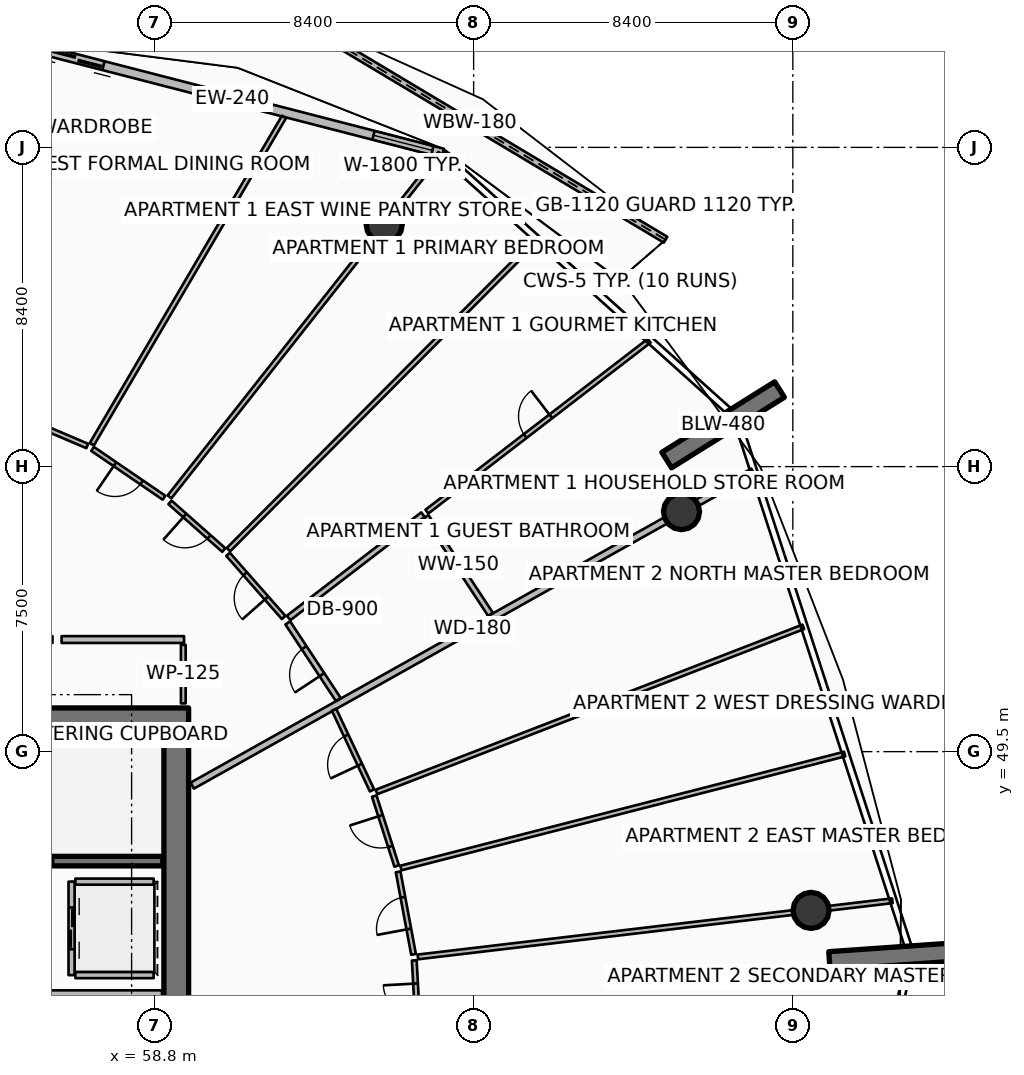
"""IFC4 building model, lengths in metres.
Left out: names, types, materials, properties, quantities, classifications, styles, units other than length and angle.
Written with IfcOpenShell. Run it as: python <this file> out.ifc"""

import sys

from ifc_helpers import new_model, si_unit, direction, frame, frame_2d, origin, origin_2d, place, context, subcontext, project, spatial, polyline, rectangle, circle, outline, extrude, element, fill, save


model = new_model("IFC4")
c1 = context("Model", 3, precision=1e-05, world=origin(), true_north=direction((0.0, 1.0)))
c2 = subcontext(c1, "Body", "Model", "MODEL_VIEW")
j1 = project(units=[si_unit("LENGTHUNIT", "METRE"), si_unit("PLANEANGLEUNIT", "RADIAN")], contexts=[c1])
p1 = place(None, origin())
s1 = spatial("IfcSite", under=j1, at=p1, CompositionType="ELEMENT")
p2 = place(p1, origin())
s2 = spatial("IfcBuilding", under=s1, at=p2, CompositionType="ELEMENT")
p3 = place(p2, frame((0.0, 0.0, 248.25)))
s3 = spatial("IfcBuildingStorey", under=s2, at=p3, CompositionType="ELEMENT", Elevation=248.25)
p4 = place(p3, frame((49.95, 50.325, 0.0), z_axis=(0.0, 0.0, 1.0), x_axis=(1.0, 0.0, 0.0)))
e1 = element("IfcWall", 1, at=p4, inside=s3, PredefinedType="SHEAR", context=c2, shape_type="SweptSolid", body=[
    extrude(rectangle(XDim=9.75, YDim=0.65, at=frame_2d((4.875, 0.0))), origin(), (0.0, 0.0, 1.0), 3.85),
])
p5 = place(p3, frame((59.375, 34.0, 0.0), z_axis=(0.0, 0.0, 1.0), x_axis=(0.0, 1.0, 0.0)))
e2 = element("IfcWall", 2, at=p5, inside=s3, PredefinedType="SHEAR", context=c2, shape_type="SweptSolid", body=[
    extrude(rectangle(XDim=16.0, YDim=0.65, at=frame_2d((8.0, 0.0))), origin(), (0.0, 0.0, 1.0), 3.85),
])
p6 = place(p3, frame((72.281, 57.173, 0.0), z_axis=(0.0, 0.0, 1.0), x_axis=(0.848033572426, 0.529942506352, 0.0)))
e3 = element("IfcWall", 3, at=p6, inside=s3, PredefinedType="SOLIDWALL", context=c2, shape_type="SweptSolid", body=[
    extrude(rectangle(XDim=3.5, YDim=0.48, at=frame_2d((1.75, 0.0))), origin(), (0.0, 0.0, 1.0), 3.85),
])
p7 = place(p3, frame((76.562, 43.997, 0.0), z_axis=(0.0, 0.0, 1.0), x_axis=(0.997563824095, 0.069759707979, 0.0)))
e4 = element("IfcWall", 4, at=p7, inside=s3, PredefinedType="SOLIDWALL", context=c2, shape_type="SweptSolid", body=[
    extrude(rectangle(XDim=3.5, YDim=0.48, at=frame_2d((1.75, 0.0))), origin(), (0.0, 0.0, 1.0), 3.85),
])
for number, where, z_axis, x_axis in (
    (5, (72.67, 55.816, 0.0), (0.0, 0.0, 1.0), (1.0, 0.0, 0.0)),
    (6, (64.847, 63.371, 0.0), (0.0, 0.0, 1.0), (1.0, 0.0, 0.0)),
    (7, (76.08, 45.323, 0.0), (0.0, 0.0, 1.0), (1.0, 0.0, 0.0)),
):
    element("IfcColumn", number, at=place(p3, frame(where, z_axis=z_axis, x_axis=x_axis)), inside=s3, PredefinedType="COLUMN", context=c2, shape_type="SweptSolid", body=[
        extrude(circle(Radius=0.475, at=origin_2d()), origin(), (0.0, 0.0, 1.0), 3.59),
    ])
p8 = place(p3, frame((72.251, 62.97, 0.0), z_axis=(0.0, 0.0, 1.0), x_axis=(-0.858273121585, 0.513193188541, 0.0)))
e8 = element("IfcWall", 8, at=p8, inside=s3, PredefinedType="PARAPET", context=c2, shape_type="SweptSolid", body=[
    extrude(outline(polyline([(0.0, 0.0), (11.996, 0.0), (11.995, 1.348), (5.998, 1.182), (0.0, 1.12), (0.0, 0.0)])), frame((0.0, 0.09, 0.0), z_axis=(0.0, -1.0, 0.0), x_axis=(1.0, 0.0, 0.0)), (0.0, 0.0, 1.0), 0.18),
])
p9 = place(p3, frame((66.386, 65.249, 0.0), z_axis=(0.0, 0.0, 1.0), x_axis=(-0.968343758421, 0.249620442927, 0.0)))
e9 = element("IfcWall", 9, at=p9, inside=s3, PredefinedType="SOLIDWALL", context=c2, shape_type="SweptSolid", body=[
    extrude(rectangle(XDim=11.438, YDim=0.24, at=frame_2d((5.719, 0.0))), origin(), (0.0, 0.0, 1.0), 2.54),
])
p10 = place(p9, frame((9.218, 0.0, 0.0)))
e10 = element("IfcOpeningElement", 10, at=p10, cuts=e9, PredefinedType="OPENING", context=c2, shape_type="SweptSolid", body=[
    extrude(rectangle(XDim=1.45, YDim=2.15, at=frame_2d((0.725, 1.075))), frame((0.0, 0.13, 0.0), z_axis=(0.0, -1.0, 0.0), x_axis=(1.0, 0.0, 0.0)), (0.0, 0.0, 1.0), 0.26),
])
p11 = place(p9, frame((0.28, 0.0, 0.65)))
e11 = element("IfcOpeningElement", 11, at=p11, cuts=e9, PredefinedType="OPENING", context=c2, shape_type="SweptSolid", body=[
    extrude(rectangle(XDim=1.6, YDim=1.5, at=frame_2d((0.8, 0.75))), frame((0.0, 0.13, 0.0), z_axis=(0.0, -1.0, 0.0), x_axis=(1.0, 0.0, 0.0)), (0.0, 0.0, 1.0), 0.26),
])
p12 = place(p3, frame((51.48, 46.62, 0.0), z_axis=(0.0, 0.0, 1.0), x_axis=(1.0, 0.0, 0.0)))
e12 = element("IfcWall", 12, at=p12, inside=s3, PredefinedType="SOLIDWALL", context=c2, shape_type="SweptSolid", body=[
    extrude(rectangle(XDim=7.54, YDim=0.25, at=frame_2d((3.77, 0.0))), origin(), (0.0, 0.0, 1.0), 3.59),
])
p13 = place(p12, frame((0.3, 0.0, 0.0)))
e13 = element("IfcOpeningElement", 13, at=p13, cuts=e12, PredefinedType="OPENING", context=c2, shape_type="SweptSolid", body=[
    extrude(rectangle(XDim=1.55, YDim=2.15, at=frame_2d((0.775, 1.075))), frame((0.0, 0.135, 0.0), z_axis=(0.0, -1.0, 0.0), x_axis=(1.0, 0.0, 0.0)), (0.0, 0.0, 1.0), 0.27),
])
p14 = place(p3, frame((56.62, 46.08, 0.0), z_axis=(0.0, 0.0, 1.0), x_axis=(0.0, -1.0, 0.0)))
e14 = element("IfcWall", 14, at=p14, inside=s3, PredefinedType="PARTITIONING", context=c2, shape_type="SweptSolid", body=[
    extrude(rectangle(XDim=2.46, YDim=0.16, at=frame_2d((1.23, 0.0))), origin(), (0.0, 0.0, 1.0), 3.59),
])
p15 = place(p14, frame((0.68, 0.0, 0.0)))
e15 = element("IfcOpeningElement", 15, at=p15, cuts=e14, PredefinedType="OPENING", context=c2, shape_type="SweptSolid", body=[
    extrude(rectangle(XDim=1.1, YDim=2.1, at=frame_2d((0.55, 1.05))), frame((0.0, 0.09, 0.0), z_axis=(0.0, -1.0, 0.0), x_axis=(1.0, 0.0, 0.0)), (0.0, 0.0, 1.0), 0.18),
])
for number, where, z_axis, x_axis in (
    (16, (56.72, 46.08, 0.0), (0.0, 0.0, 1.0), (1.0, 0.0, 0.0)),
    (17, (56.72, 43.62, 0.0), (0.0, 0.0, 1.0), (1.0, 0.0, 0.0)),
):
    element("IfcWall", number, at=place(p3, frame(where, z_axis=z_axis, x_axis=x_axis)), inside=s3, PredefinedType="PARTITIONING", context=c2, shape_type="SweptSolid", body=[
        extrude(rectangle(XDim=2.06, YDim=0.16, at=frame_2d((1.03, 0.0))), origin(), (0.0, 0.0, 1.0), 3.59),
    ])
p16 = place(p3, frame((50.12, 43.12, 0.0), z_axis=(0.0, 0.0, 1.0), x_axis=(1.0, 0.0, 0.0)))
e18 = element("IfcWall", 18, at=p16, inside=s3, PredefinedType="PARTITIONING", context=c2, shape_type="SweptSolid", body=[
    extrude(rectangle(XDim=8.88, YDim=0.2, at=frame_2d((4.44, 0.0))), origin(), (0.0, 0.0, 1.0), 3.59),
])
p17 = place(p3, frame((59.56, 50.77, 0.0), z_axis=(0.0, 0.0, 1.0), x_axis=(0.0, 1.0, 0.0)))
e19 = element("IfcWall", 19, at=p17, inside=s3, PredefinedType="PARTITIONING", context=c2, shape_type="SweptSolid", body=[
    extrude(rectangle(XDim=1.54, YDim=0.125, at=frame_2d((0.77, 0.0))), origin(), (0.0, 0.0, 1.0), 3.03),
])
p18 = place(p3, frame((59.796, 48.606, 0.0), z_axis=(0.0, 0.0, 1.0), x_axis=(0.872493213488, 0.488626229767, 0.0)))
e20 = element("IfcWall", 20, at=p18, inside=s3, PredefinedType="PARTITIONING", context=c2, shape_type="SweptSolid", body=[
    extrude(rectangle(XDim=16.91, YDim=0.18, at=frame_2d((8.455, 0.0))), origin(), (0.0, 0.0, 1.0), 2.957),
])
p19 = place(p3, frame((59.58, 52.45, 0.0), z_axis=(0.0, 0.0, 1.0), x_axis=(-1.0, 0.0, 0.0)))
e21 = element("IfcWall", 21, at=p19, inside=s3, PredefinedType="PARTITIONING", context=c2, shape_type="SweptSolid", body=[
    extrude(rectangle(XDim=3.222, YDim=0.18, at=frame_2d((1.611, 0.0))), origin(), (0.0, 0.0, 1.0), 2.957),
])
p20 = place(p3, frame((63.639, 50.872, 0.0), z_axis=(0.0, 0.0, 1.0), x_axis=(-0.550539267926, 0.834809268319, 0.0)))
e22 = element("IfcWall", 22, at=p20, inside=s3, PredefinedType="PARTITIONING", context=c2, shape_type="SweptSolid", body=[
    extrude(rectangle(XDim=2.414, YDim=0.15, at=frame_2d((1.207, 0.0))), origin(), (0.0, 0.0, 1.0), 2.957),
])
p21 = place(p20, frame((0.782, 0.0, 0.0)))
e23 = element("IfcOpeningElement", 23, at=p21, cuts=e22, PredefinedType="OPENING", context=c2, shape_type="SweptSolid", body=[
    extrude(rectangle(XDim=0.85, YDim=2.06, at=frame_2d((0.425, 1.03))), frame((0.0, 0.085, 0.0), z_axis=(0.0, -1.0, 0.0), x_axis=(1.0, 0.0, 0.0)), (0.0, 0.0, 1.0), 0.17),
])
p22 = place(p3, frame((67.643, 53.115, 0.0), z_axis=(0.0, 0.0, 1.0), x_axis=(-0.550484224605, 0.834845565635, 0.0)))
e24 = element("IfcWall", 24, at=p22, inside=s3, PredefinedType="PARTITIONING", context=c2, shape_type="SweptSolid", body=[
    extrude(rectangle(XDim=3.079, YDim=0.15, at=frame_2d((1.54, 0.0))), origin(), (0.0, 0.0, 1.0), 2.957),
])
p23 = place(p3, frame((62.331, 53.018, 0.0), z_axis=(0.0, 0.0, 1.0), x_axis=(0.792803030826, 0.609477935871, 0.0)))
e25 = element("IfcWall", 25, at=p23, inside=s3, PredefinedType="PARTITIONING", context=c2, shape_type="SweptSolid", body=[
    extrude(rectangle(XDim=4.46, YDim=0.15, at=frame_2d((2.23, 0.0))), origin(), (0.0, 0.0, 1.0), 3.03),
])
p24 = place(p3, frame((65.97, 55.815, 0.0), z_axis=(0.0, 0.0, 1.0), x_axis=(0.792798660545, 0.609483620647, 0.0)))
e26 = element("IfcWall", 26, at=p24, inside=s3, PredefinedType="PARTITIONING", context=c2, shape_type="SweptSolid", body=[
    extrude(rectangle(XDim=7.377, YDim=0.125, at=frame_2d((3.688, 0.0))), origin(), (0.0, 0.0, 1.0), 3.03),
])
p25 = place(p24, frame((3.263, 0.0, 0.0)))
e27 = element("IfcOpeningElement", 27, at=p25, cuts=e26, PredefinedType="OPENING", context=c2, shape_type="SweptSolid", body=[
    extrude(rectangle(XDim=0.85, YDim=2.06, at=frame_2d((0.425, 1.03))), frame((0.0, 0.073, 0.0), z_axis=(0.0, -1.0, 0.0), x_axis=(1.0, 0.0, 0.0)), (0.0, 0.0, 1.0), 0.145),
])
p26 = place(p3, frame((60.749, 54.815, 0.0), z_axis=(0.0, 0.0, 1.0), x_axis=(0.705267705861, 0.708941085753, 0.0)))
e28 = element("IfcWall", 28, at=p26, inside=s3, PredefinedType="PARTITIONING", context=c2, shape_type="SweptSolid", body=[
    extrude(rectangle(XDim=11.498, YDim=0.125, at=frame_2d((5.749, 0.0))), origin(), (0.0, 0.0, 1.0), 3.03),
])
p27 = place(p3, frame((62.2, 53.031, 0.0), z_axis=(0.0, 0.0, 1.0), x_axis=(-0.660650282497, 0.750693815238, 0.0)))
e29 = element("IfcWall", 29, at=p27, inside=s3, PredefinedType="PARTITIONING", context=c2, shape_type="SweptSolid", body=[
    extrude(rectangle(XDim=2.212, YDim=0.125, at=frame_2d((1.106, 0.0))), origin(), (0.0, 0.0, 1.0), 3.03),
])
p28 = place(p27, frame((0.681, 0.0, 0.0)))
e30 = element("IfcOpeningElement", 30, at=p28, cuts=e29, PredefinedType="OPENING", context=c2, shape_type="SweptSolid", body=[
    extrude(rectangle(XDim=0.85, YDim=2.06, at=frame_2d((0.425, 1.03))), frame((0.0, 0.073, 0.0), z_axis=(0.0, -1.0, 0.0), x_axis=(1.0, 0.0, 0.0)), (0.0, 0.0, 1.0), 0.145),
])
p29 = place(p3, frame((60.626, 54.805, 0.0), z_axis=(0.0, 0.0, 1.0), x_axis=(-0.748419746602, 0.663225363581, 0.0)))
e31 = element("IfcWall", 31, at=p29, inside=s3, PredefinedType="PARTITIONING", context=c2, shape_type="SweptSolid", body=[
    extrude(rectangle(XDim=1.891, YDim=0.125, at=frame_2d((0.946, 0.0))), origin(), (0.0, 0.0, 1.0), 2.957),
])
p30 = place(p29, frame((0.521, 0.0, 0.0)))
e32 = element("IfcOpeningElement", 32, at=p30, cuts=e31, PredefinedType="OPENING", context=c2, shape_type="SweptSolid", body=[
    extrude(rectangle(XDim=0.85, YDim=2.06, at=frame_2d((0.425, 1.03))), frame((0.0, 0.073, 0.0), z_axis=(0.0, -1.0, 0.0), x_axis=(1.0, 0.0, 0.0)), (0.0, 0.0, 1.0), 0.145),
])
p31 = place(p3, frame((56.118, 52.45, 0.0), z_axis=(0.0, 0.0, 1.0), x_axis=(-1.0, 0.0, 0.0)))
e33 = element("IfcWall", 33, at=p31, inside=s3, PredefinedType="PARTITIONING", context=c2, shape_type="SweptSolid", body=[
    extrude(rectangle(XDim=5.051, YDim=0.18, at=frame_2d((2.525, 0.0))), origin(), (0.0, 0.0, 1.0), 2.957),
])
p32 = place(p3, frame((59.198, 56.204, 0.0), z_axis=(0.0, 0.0, 1.0), x_axis=(0.619101452742, 0.785311015593, 0.0)))
e34 = element("IfcWall", 34, at=p32, inside=s3, PredefinedType="PARTITIONING", context=c2, shape_type="SweptSolid", body=[
    extrude(rectangle(XDim=11.509, YDim=0.125, at=frame_2d((5.754, 0.0))), origin(), (0.0, 0.0, 1.0), 2.957),
])
p33 = place(p3, frame((57.153, 57.588, 0.0), z_axis=(0.0, 0.0, 1.0), x_axis=(0.506323477253, 0.862343630105, 0.0)))
e35 = element("IfcWall", 35, at=p33, inside=s3, PredefinedType="PARTITIONING", context=c2, shape_type="SweptSolid", body=[
    extrude(rectangle(XDim=9.988, YDim=0.125, at=frame_2d((4.994, 0.0))), origin(), (0.0, 0.0, 1.0), 3.03),
])
p34 = place(p3, frame((59.053, 56.182, 0.0), z_axis=(0.0, 0.0, 1.0), x_axis=(-0.825709590898, 0.56409544538, 0.0)))
e36 = element("IfcWall", 36, at=p34, inside=s3, PredefinedType="PARTITIONING", context=c2, shape_type="SweptSolid", body=[
    extrude(rectangle(XDim=2.276, YDim=0.125, at=frame_2d((1.138, 0.0))), origin(), (0.0, 0.0, 1.0), 2.957),
])
p35 = place(p34, frame((0.713, 0.0, 0.0)))
e37 = element("IfcOpeningElement", 37, at=p35, cuts=e36, PredefinedType="OPENING", context=c2, shape_type="SweptSolid", body=[
    extrude(rectangle(XDim=0.85, YDim=2.06, at=frame_2d((0.425, 1.03))), frame((0.0, 0.073, 0.0), z_axis=(0.0, -1.0, 0.0), x_axis=(1.0, 0.0, 0.0)), (0.0, 0.0, 1.0), 0.145),
])
p36 = place(p3, frame((57.034, 57.542, 0.0), z_axis=(0.0, 0.0, 1.0), x_axis=(-0.919921628857, 0.392102278445, 0.0)))
e38 = element("IfcWall", 38, at=p36, inside=s3, PredefinedType="PARTITIONING", context=c2, shape_type="SweptSolid", body=[
    extrude(rectangle(XDim=4.413, YDim=0.125, at=frame_2d((2.206, 0.0))), origin(), (0.0, 0.0, 1.0), 2.957),
])
p37 = place(p36, frame((1.756, 0.0, 0.0)))
e39 = element("IfcOpeningElement", 39, at=p37, cuts=e38, PredefinedType="OPENING", context=c2, shape_type="SweptSolid", body=[
    extrude(rectangle(XDim=0.9, YDim=2.08, at=frame_2d((0.45, 1.04))), frame((0.0, 0.073, 0.0), z_axis=(0.0, -1.0, 0.0), x_axis=(1.0, 0.0, 0.0)), (0.0, 0.0, 1.0), 0.145),
])
p38 = place(p3, frame((65.752, 41.94, 0.0), z_axis=(0.0, 0.0, 1.0), x_axis=(-0.055084577693, 0.998481692021, 0.0)))
e40 = element("IfcWall", 40, at=p38, inside=s3, PredefinedType="PARTITIONING", context=c2, shape_type="SweptSolid", body=[
    extrude(rectangle(XDim=2.07, YDim=0.125, at=frame_2d((1.035, 0.0))), origin(), (0.0, 0.0, 1.0), 2.957),
])
p39 = place(p38, frame((0.61, 0.0, 0.0)))
e41 = element("IfcOpeningElement", 41, at=p39, cuts=e40, PredefinedType="OPENING", context=c2, shape_type="SweptSolid", body=[
    extrude(rectangle(XDim=0.85, YDim=2.06, at=frame_2d((0.425, 1.03))), frame((0.0, 0.073, 0.0), z_axis=(0.0, -1.0, 0.0), x_axis=(1.0, 0.0, 0.0)), (0.0, 0.0, 1.0), 0.145),
])
p40 = place(p3, frame((65.733, 44.099, 0.0), z_axis=(0.0, 0.0, 1.0), x_axis=(0.99306831242, 0.117538618625, 0.0)))
e42 = element("IfcWall", 42, at=p40, inside=s3, PredefinedType="PARTITIONING", context=c2, shape_type="SweptSolid", body=[
    extrude(rectangle(XDim=12.573, YDim=0.125, at=frame_2d((6.286, 0.0))), origin(), (0.0, 0.0, 1.0), 2.957),
])
p41 = place(p3, frame((65.286, 46.438, 0.0), z_axis=(0.0, 0.0, 1.0), x_axis=(0.968583991447, 0.248686653265, 0.0)))
e43 = element("IfcWall", 43, at=p41, inside=s3, PredefinedType="PARTITIONING", context=c2, shape_type="SweptSolid", body=[
    extrude(rectangle(XDim=12.056, YDim=0.125, at=frame_2d((6.028, 0.0))), origin(), (0.0, 0.0, 1.0), 3.03),
])
p42 = place(p3, frame((64.645, 48.439, 0.0), z_axis=(0.0, 0.0, 1.0), x_axis=(0.93263897003, 0.360810963778, 0.0)))
e44 = element("IfcWall", 44, at=p42, inside=s3, PredefinedType="PARTITIONING", context=c2, shape_type="SweptSolid", body=[
    extrude(rectangle(XDim=12.043, YDim=0.125, at=frame_2d((6.021, 0.0))), origin(), (0.0, 0.0, 1.0), 3.03),
])
p43 = place(p3, frame((65.619, 44.166, 0.0), z_axis=(0.0, 0.0, 1.0), x_axis=(-0.183454395516, 0.983028221755, 0.0)))
e45 = element("IfcWall", 45, at=p43, inside=s3, PredefinedType="PARTITIONING", context=c2, shape_type="SweptSolid", body=[
    extrude(rectangle(XDim=2.209, YDim=0.125, at=frame_2d((1.104, 0.0))), origin(), (0.0, 0.0, 1.0), 2.957),
])
p44 = place(p43, frame((0.68, 0.0, 0.0)))
e46 = element("IfcOpeningElement", 46, at=p44, cuts=e45, PredefinedType="OPENING", context=c2, shape_type="SweptSolid", body=[
    extrude(rectangle(XDim=0.85, YDim=2.06, at=frame_2d((0.425, 1.03))), frame((0.0, 0.073, 0.0), z_axis=(0.0, -1.0, 0.0), x_axis=(1.0, 0.0, 0.0)), (0.0, 0.0, 1.0), 0.145),
])
p45 = place(p3, frame((65.175, 46.492, 0.0), z_axis=(0.0, 0.0, 1.0), x_axis=(-0.305358332679, 0.952237516938, 0.0)))
e47 = element("IfcWall", 47, at=p45, inside=s3, PredefinedType="PARTITIONING", context=c2, shape_type="SweptSolid", body=[
    extrude(rectangle(XDim=1.931, YDim=0.125, at=frame_2d((0.965, 0.0))), origin(), (0.0, 0.0, 1.0), 3.03),
])
p46 = place(p45, frame((0.54, 0.0, 0.0)))
e48 = element("IfcOpeningElement", 48, at=p46, cuts=e47, PredefinedType="OPENING", context=c2, shape_type="SweptSolid", body=[
    extrude(rectangle(XDim=0.85, YDim=2.06, at=frame_2d((0.425, 1.03))), frame((0.0, 0.073, 0.0), z_axis=(0.0, -1.0, 0.0), x_axis=(1.0, 0.0, 0.0)), (0.0, 0.0, 1.0), 0.145),
])
p47 = place(p3, frame((64.527, 48.479, 0.0), z_axis=(0.0, 0.0, 1.0), x_axis=(-0.425751972865, 0.904839907167, 0.0)))
e49 = element("IfcWall", 49, at=p47, inside=s3, PredefinedType="PARTITIONING", context=c2, shape_type="SweptSolid", body=[
    extrude(rectangle(XDim=2.348, YDim=0.125, at=frame_2d((1.174, 0.0))), origin(), (0.0, 0.0, 1.0), 2.957),
])
p48 = place(p47, frame((0.749, 0.0, 0.0)))
e50 = element("IfcOpeningElement", 50, at=p48, cuts=e49, PredefinedType="OPENING", context=c2, shape_type="SweptSolid", body=[
    extrude(rectangle(XDim=0.85, YDim=2.06, at=frame_2d((0.425, 1.03))), frame((0.0, 0.073, 0.0), z_axis=(0.0, -1.0, 0.0), x_axis=(1.0, 0.0, 0.0)), (0.0, 0.0, 1.0), 0.145),
])
p49 = place(p10, origin())
e51 = element("IfcDoor", 51, at=p49, inside=s3, OperationType="DOUBLE_DOOR_SLIDING", PredefinedType="DOOR", context=c2, shape_type="SweptSolid", body=[
    extrude(rectangle(XDim=1.45, YDim=2.15, at=frame_2d((0.725, 1.075))), frame((0.0, 0.025, 0.0), z_axis=(0.0, -1.0, 0.0), x_axis=(1.0, 0.0, 0.0)), (0.0, 0.0, 1.0), 0.05),
])
fill(e10, e51)
p50 = place(p11, origin())
e52 = element("IfcWindow", 52, at=p50, inside=s3, PartitioningType="SINGLE_PANEL", PredefinedType="WINDOW", context=c2, shape_type="SweptSolid", body=[
    extrude(rectangle(XDim=1.6, YDim=1.5, at=frame_2d((0.8, 0.75))), frame((0.0, 0.03, 0.0), z_axis=(0.0, -1.0, 0.0), x_axis=(1.0, 0.0, 0.0)), (0.0, 0.0, 1.0), 0.06),
])
fill(e11, e52)
p51 = place(p15, origin())
e53 = element("IfcDoor", 53, at=p51, inside=s3, OperationType="DOUBLE_DOOR_SLIDING", PredefinedType="DOOR", context=c2, shape_type="SweptSolid", body=[
    extrude(rectangle(XDim=1.1, YDim=2.1, at=frame_2d((0.55, 1.05))), frame((0.0, 0.025, 0.0), z_axis=(0.0, -1.0, 0.0), x_axis=(1.0, 0.0, 0.0)), (0.0, 0.0, 1.0), 0.05),
])
fill(e15, e53)
p52 = place(p21, origin())
e54 = element("IfcDoor", 54, at=p52, inside=s3, OperationType="SINGLE_SWING_LEFT", PredefinedType="DOOR", context=c2, shape_type="SweptSolid", body=[
    extrude(rectangle(XDim=0.85, YDim=2.06, at=frame_2d((0.425, 1.03))), frame((0.0, 0.025, 0.0), z_axis=(0.0, -1.0, 0.0), x_axis=(1.0, 0.0, 0.0)), (0.0, 0.0, 1.0), 0.05),
])
fill(e23, e54)
p53 = place(p25, origin())
e55 = element("IfcDoor", 55, at=p53, inside=s3, OperationType="SINGLE_SWING_RIGHT", PredefinedType="DOOR", context=c2, shape_type="SweptSolid", body=[
    extrude(rectangle(XDim=0.85, YDim=2.06, at=frame_2d((0.425, 1.03))), frame((0.0, 0.025, 0.0), z_axis=(0.0, -1.0, 0.0), x_axis=(1.0, 0.0, 0.0)), (0.0, 0.0, 1.0), 0.05),
])
fill(e27, e55)
p54 = place(p28, origin())
e56 = element("IfcDoor", 56, at=p54, inside=s3, OperationType="SINGLE_SWING_LEFT", PredefinedType="DOOR", context=c2, shape_type="SweptSolid", body=[
    extrude(rectangle(XDim=0.85, YDim=2.06, at=frame_2d((0.425, 1.03))), frame((0.0, 0.025, 0.0), z_axis=(0.0, -1.0, 0.0), x_axis=(1.0, 0.0, 0.0)), (0.0, 0.0, 1.0), 0.05),
])
fill(e30, e56)
p55 = place(p30, origin())
e57 = element("IfcDoor", 57, at=p55, inside=s3, OperationType="SINGLE_SWING_RIGHT", PredefinedType="DOOR", context=c2, shape_type="SweptSolid", body=[
    extrude(rectangle(XDim=0.85, YDim=2.06, at=frame_2d((0.425, 1.03))), frame((0.0, 0.025, 0.0), z_axis=(0.0, -1.0, 0.0), x_axis=(1.0, 0.0, 0.0)), (0.0, 0.0, 1.0), 0.05),
])
fill(e32, e57)
p56 = place(p35, origin())
e58 = element("IfcDoor", 58, at=p56, inside=s3, OperationType="SINGLE_SWING_RIGHT", PredefinedType="DOOR", context=c2, shape_type="SweptSolid", body=[
    extrude(rectangle(XDim=0.85, YDim=2.06, at=frame_2d((0.425, 1.03))), frame((0.0, 0.025, 0.0), z_axis=(0.0, -1.0, 0.0), x_axis=(1.0, 0.0, 0.0)), (0.0, 0.0, 1.0), 0.05),
])
fill(e37, e58)
p57 = place(p39, origin())
e59 = element("IfcDoor", 59, at=p57, inside=s3, OperationType="SINGLE_SWING_RIGHT", PredefinedType="DOOR", context=c2, shape_type="SweptSolid", body=[
    extrude(rectangle(XDim=0.85, YDim=2.06, at=frame_2d((0.425, 1.03))), frame((0.0, 0.025, 0.0), z_axis=(0.0, -1.0, 0.0), x_axis=(1.0, 0.0, 0.0)), (0.0, 0.0, 1.0), 0.05),
])
fill(e41, e59)
p58 = place(p44, origin())
e60 = element("IfcDoor", 60, at=p58, inside=s3, OperationType="SINGLE_SWING_LEFT", PredefinedType="DOOR", context=c2, shape_type="SweptSolid", body=[
    extrude(rectangle(XDim=0.85, YDim=2.06, at=frame_2d((0.425, 1.03))), frame((0.0, 0.025, 0.0), z_axis=(0.0, -1.0, 0.0), x_axis=(1.0, 0.0, 0.0)), (0.0, 0.0, 1.0), 0.05),
])
fill(e46, e60)
p59 = place(p46, origin())
e61 = element("IfcDoor", 61, at=p59, inside=s3, OperationType="SINGLE_SWING_RIGHT", PredefinedType="DOOR", context=c2, shape_type="SweptSolid", body=[
    extrude(rectangle(XDim=0.85, YDim=2.06, at=frame_2d((0.425, 1.03))), frame((0.0, 0.025, 0.0), z_axis=(0.0, -1.0, 0.0), x_axis=(1.0, 0.0, 0.0)), (0.0, 0.0, 1.0), 0.05),
])
fill(e48, e61)
p60 = place(p48, origin())
e62 = element("IfcDoor", 62, at=p60, inside=s3, OperationType="SINGLE_SWING_LEFT", PredefinedType="DOOR", context=c2, shape_type="SweptSolid", body=[
    extrude(rectangle(XDim=0.85, YDim=2.06, at=frame_2d((0.425, 1.03))), frame((0.0, 0.025, 0.0), z_axis=(0.0, -1.0, 0.0), x_axis=(1.0, 0.0, 0.0)), (0.0, 0.0, 1.0), 0.05),
])
fill(e50, e62)
save(model, sys.argv[1])
